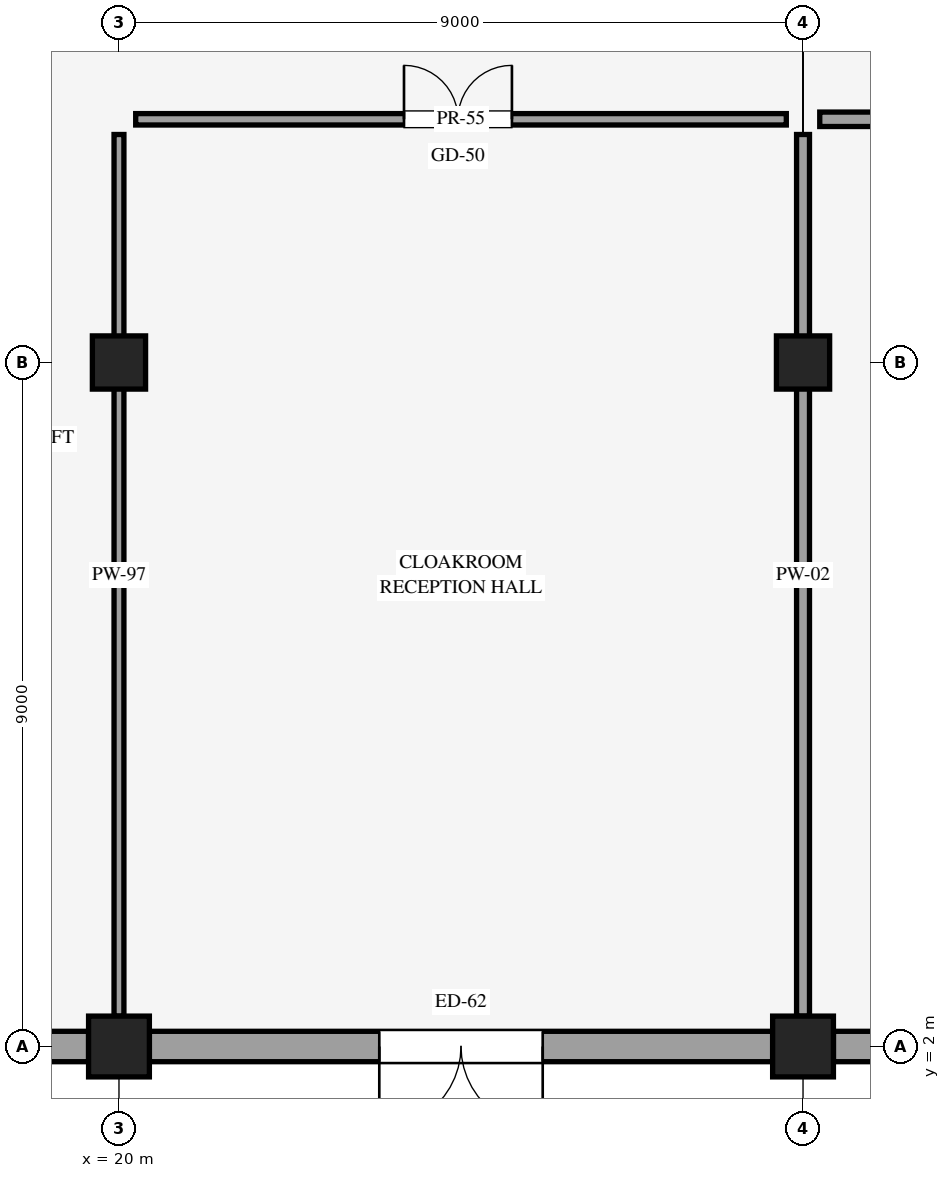
"""IFC4 building model, lengths in metres.
Left out: names, types, materials, properties, quantities, classifications, styles, units other than length and angle.
Written with IfcOpenShell. Run it as: python <this file> out.ifc"""

import sys

from ifc_helpers import new_model, si_unit, direction, frame, frame_2d, origin, origin_2d, place, context, subcontext, project, spatial, rectangle, extrude, element, fill, save


model = new_model("IFC4")
c1 = context("Model", 3, precision=1e-05, world=origin(), true_north=direction((0.0, 1.0)))
c2 = subcontext(c1, "Body", "Model", "MODEL_VIEW")
j1 = project(units=[si_unit("LENGTHUNIT", "METRE"), si_unit("PLANEANGLEUNIT", "RADIAN")], contexts=[c1])
p1 = place(None, origin())
s1 = spatial("IfcSite", under=j1, at=p1, CompositionType="ELEMENT")
p2 = place(p1, origin())
s2 = spatial("IfcBuilding", under=s1, at=p2, CompositionType="ELEMENT")
p3 = place(p2, origin())
s3 = spatial("IfcBuildingStorey", under=s2, at=p3, CompositionType="ELEMENT", Elevation=0.0)
p4 = place(p3, frame((20.0, 2.0, 0.0), z_axis=(0.0, 0.0, 1.0), x_axis=(1.0, 0.0, 0.0)))
e1 = element("IfcColumn", 1, at=p4, inside=s3, PredefinedType="COLUMN", context=c2, shape_type="SweptSolid", body=[
    extrude(rectangle(XDim=0.8, YDim=0.8, at=origin_2d()), origin(), (0.0, 0.0, 1.0), 5.4),
])
p5 = place(p3, frame((20.0, 11.0, 0.0), z_axis=(0.0, 0.0, 1.0), x_axis=(1.0, 0.0, 0.0)))
e2 = element("IfcColumn", 2, at=p5, inside=s3, PredefinedType="COLUMN", context=c2, shape_type="SweptSolid", body=[
    extrude(rectangle(XDim=0.7, YDim=0.7, at=origin_2d()), origin(), (0.0, 0.0, 1.0), 5.4),
])
p6 = place(p3, frame((29.0, 2.0, 0.0), z_axis=(0.0, 0.0, 1.0), x_axis=(1.0, 0.0, 0.0)))
e3 = element("IfcColumn", 3, at=p6, inside=s3, PredefinedType="COLUMN", context=c2, shape_type="SweptSolid", body=[
    extrude(rectangle(XDim=0.8, YDim=0.8, at=origin_2d()), origin(), (0.0, 0.0, 1.0), 5.4),
])
p7 = place(p3, frame((29.0, 11.0, 0.0), z_axis=(0.0, 0.0, 1.0), x_axis=(1.0, 0.0, 0.0)))
e4 = element("IfcColumn", 4, at=p7, inside=s3, PredefinedType="COLUMN", context=c2, shape_type="SweptSolid", body=[
    extrude(rectangle(XDim=0.7, YDim=0.7, at=origin_2d()), origin(), (0.0, 0.0, 1.0), 5.4),
])
p8 = place(p3, frame((11.4, 2.0, 0.0), z_axis=(0.0, 0.0, 1.0), x_axis=(1.0, 0.0, 0.0)))
e5 = element("IfcWall", 5, at=p8, inside=s3, PredefinedType="STANDARD", context=c2, shape_type="SweptSolid", body=[
    extrude(rectangle(XDim=8.2, YDim=0.4, at=frame_2d((4.1, 0.0))), origin(), (0.0, 0.0, 1.0), 4.095),
])
p9 = place(p8, frame((5.2, 0.0, 0.0), z_axis=(0.0, 0.0, 1.0), x_axis=(-1.0, 0.0, 0.0)))
e6 = element("IfcOpeningElement", 6, at=p9, cuts=e5, PredefinedType="OPENING", context=c2, shape_type="SweptSolid", body=[
    extrude(rectangle(XDim=2.2, YDim=2.5, at=frame_2d((1.1, 1.25))), frame((0.0, 0.21, 0.0), z_axis=(0.0, -1.0, 0.0), x_axis=(1.0, 0.0, 0.0)), (0.0, 0.0, 1.0), 0.42),
])
p10 = place(p3, frame((20.4, 2.0, 0.0), z_axis=(0.0, 0.0, 1.0), x_axis=(1.0, 0.0, 0.0)))
e7 = element("IfcWall", 7, at=p10, inside=s3, PredefinedType="STANDARD", context=c2, shape_type="SweptSolid", body=[
    extrude(rectangle(XDim=8.2, YDim=0.4, at=frame_2d((4.1, 0.0))), origin(), (0.0, 0.0, 1.0), 4.095),
])
p11 = place(p10, frame((5.175, 0.0, 0.0), z_axis=(0.0, 0.0, 1.0), x_axis=(-1.0, 0.0, 0.0)))
e8 = element("IfcOpeningElement", 8, at=p11, cuts=e7, PredefinedType="OPENING", context=c2, shape_type="SweptSolid", body=[
    extrude(rectangle(XDim=2.15, YDim=2.5, at=frame_2d((1.075, 1.25))), frame((0.0, 0.21, 0.0), z_axis=(0.0, -1.0, 0.0), x_axis=(1.0, 0.0, 0.0)), (0.0, 0.0, 1.0), 0.42),
])
p12 = place(p3, frame((29.4, 2.0, 0.0), z_axis=(0.0, 0.0, 1.0), x_axis=(1.0, 0.0, 0.0)))
e9 = element("IfcWall", 9, at=p12, inside=s3, PredefinedType="STANDARD", context=c2, shape_type="SweptSolid", body=[
    extrude(rectangle(XDim=8.2, YDim=0.4, at=frame_2d((4.1, 0.0))), origin(), (0.0, 0.0, 1.0), 4.095),
])
p13 = place(p12, frame((4.925, 0.0, 0.85), z_axis=(0.0, 0.0, 1.0), x_axis=(-1.0, 0.0, 0.0)))
e10 = element("IfcOpeningElement", 10, at=p13, cuts=e9, PredefinedType="OPENING", context=c2, shape_type="SweptSolid", body=[
    extrude(rectangle(XDim=1.65, YDim=2.0, at=frame_2d((0.825, 1.0))), frame((0.0, 0.21, 0.0), z_axis=(0.0, -1.0, 0.0), x_axis=(1.0, 0.0, 0.0)), (0.0, 0.0, 1.0), 0.42),
])
p14 = place(p3, frame((20.0, 2.4, 0.0), z_axis=(0.0, 0.0, 1.0), x_axis=(0.0, 1.0, 0.0)))
e11 = element("IfcWall", 11, at=p14, inside=s3, PredefinedType="PARTITIONING", context=c2, shape_type="SweptSolid", body=[
    extrude(rectangle(XDim=11.6, YDim=0.13, at=frame_2d((5.8, 0.0))), origin(), (0.0, 0.0, 1.0), 4.095),
])
p15 = place(p3, frame((20.22, 14.2, 0.0), z_axis=(0.0, 0.0, 1.0), x_axis=(1.0, 0.0, 0.0)))
e12 = element("IfcWall", 12, at=p15, inside=s3, PredefinedType="PARTITIONING", context=c2, shape_type="SweptSolid", body=[
    extrude(rectangle(XDim=8.56, YDim=0.15, at=frame_2d((4.28, 0.0))), origin(), (0.0, 0.0, 1.0), 4.095),
])
p16 = place(p15, frame((3.53, 0.0, 0.0)))
e13 = element("IfcOpeningElement", 13, at=p16, cuts=e12, PredefinedType="OPENING", context=c2, shape_type="SweptSolid", body=[
    extrude(rectangle(XDim=1.42, YDim=2.3, at=frame_2d((0.71, 1.15))), frame((0.0, 0.085, 0.0), z_axis=(0.0, -1.0, 0.0), x_axis=(1.0, 0.0, 0.0)), (0.0, 0.0, 1.0), 0.17),
])
p17 = place(p3, frame((29.0, 2.4, 0.0), z_axis=(0.0, 0.0, 1.0), x_axis=(0.0, 1.0, 0.0)))
e14 = element("IfcWall", 14, at=p17, inside=s3, PredefinedType="PARTITIONING", context=c2, shape_type="SweptSolid", body=[
    extrude(rectangle(XDim=11.6, YDim=0.17, at=frame_2d((5.8, 0.0))), origin(), (0.0, 0.0, 1.0), 4.095),
])
p18 = place(p3, frame((29.22, 14.2, 0.0), z_axis=(0.0, 0.0, 1.0), x_axis=(1.0, 0.0, 0.0)))
e15 = element("IfcWall", 15, at=p18, inside=s3, PredefinedType="PARTITIONING", context=c2, shape_type="SweptSolid", body=[
    extrude(rectangle(XDim=8.91, YDim=0.19, at=frame_2d((4.455, 0.0))), origin(), (0.0, 0.0, 1.0), 4.095),
])
p19 = place(p18, frame((3.505, 0.0, 0.0)))
e16 = element("IfcOpeningElement", 16, at=p19, cuts=e15, PredefinedType="OPENING", context=c2, shape_type="SweptSolid", body=[
    extrude(rectangle(XDim=1.5, YDim=2.35, at=frame_2d((0.75, 1.175))), frame((0.0, 0.105, 0.0), z_axis=(0.0, -1.0, 0.0), x_axis=(1.0, 0.0, 0.0)), (0.0, 0.0, 1.0), 0.21),
])
p20 = place(p11, origin())
e17 = element("IfcDoor", 17, at=p20, inside=s3, OperationType="DOUBLE_DOOR_SINGLE_SWING", PredefinedType="DOOR", context=c2, shape_type="SweptSolid", body=[
    extrude(rectangle(XDim=2.15, YDim=2.5, at=frame_2d((1.075, 1.25))), frame((0.0, 0.025, 0.0), z_axis=(0.0, -1.0, 0.0), x_axis=(1.0, 0.0, 0.0)), (0.0, 0.0, 1.0), 0.05),
])
fill(e8, e17)
p21 = place(p16, origin())
e18 = element("IfcDoor", 18, at=p21, inside=s3, OperationType="DOUBLE_DOOR_SINGLE_SWING", PredefinedType="DOOR", context=c2, shape_type="SweptSolid", body=[
    extrude(rectangle(XDim=1.42, YDim=2.3, at=frame_2d((0.71, 1.15))), frame((0.0, 0.025, 0.0), z_axis=(0.0, -1.0, 0.0), x_axis=(1.0, 0.0, 0.0)), (0.0, 0.0, 1.0), 0.05),
])
fill(e13, e18)
save(model, sys.argv[1])
